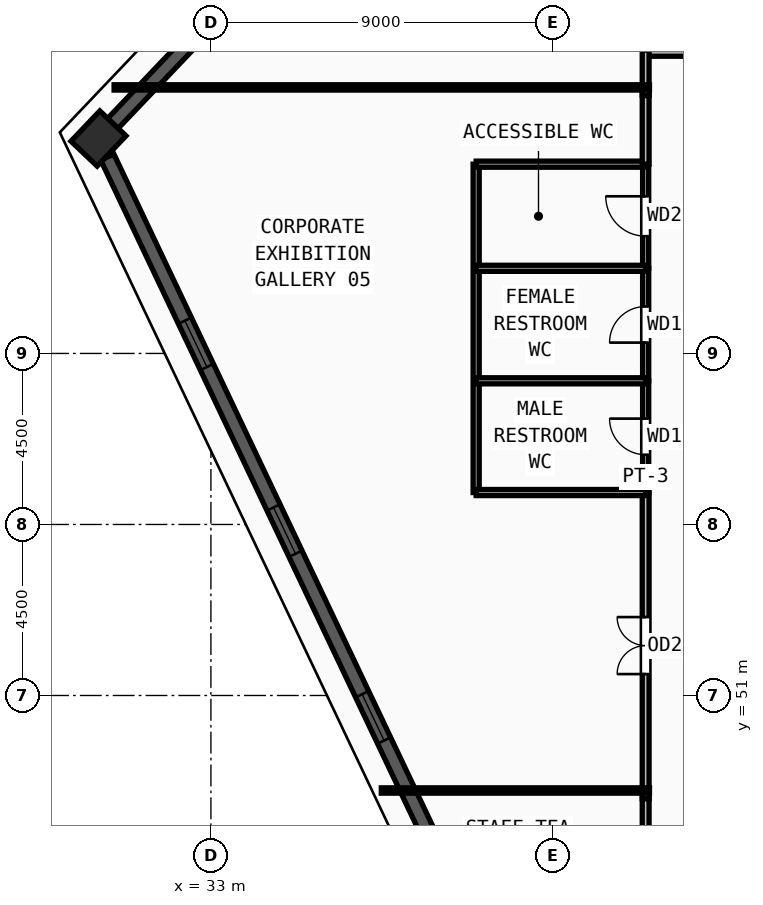
"""IFC4 building model, lengths in metres.
Left out: names, types, materials, properties, quantities, classifications, styles, units other than length and angle.
Written with IfcOpenShell. Run it as: python <this file> out.ifc"""

import sys

from ifc_helpers import new_model, si_unit, direction, frame, frame_2d, origin, origin_2d, place, context, subcontext, project, spatial, rectangle, extrude, source, transform, mapped, element, fill, save


model = new_model("IFC4")
c1 = context("Model", 3, precision=1e-05, world=origin(), true_north=direction((0.0, 1.0)))
c2 = subcontext(c1, "Body", "Model", "MODEL_VIEW")
j1 = project(units=[si_unit("LENGTHUNIT", "METRE"), si_unit("PLANEANGLEUNIT", "RADIAN")], contexts=[c1])
p1 = place(None, origin())
s1 = spatial("IfcSite", under=j1, at=p1, CompositionType="ELEMENT")
p2 = place(p1, origin())
s2 = spatial("IfcBuilding", under=s1, at=p2, CompositionType="ELEMENT")
p3 = place(p2, frame((0.0, 0.0, 309.0)))
s3 = spatial("IfcBuildingStorey", under=s2, at=p3, CompositionType="ELEMENT", Elevation=309.0)
m1 = source(origin(), c2, "Body", "SweptSolid", [
    extrude(rectangle(XDim=1.1, YDim=0.95, at=origin_2d()), origin(), (0.0, 0.0, 1.0), 3.75),
])
p4 = place(p3, frame((30.042, 65.655, 0.0), z_axis=(0.0, 0.0, 1.0), x_axis=(0.68936671806, 0.724412539946, 0.0)))
e1 = element("IfcColumn", 1, at=p4, inside=s3, PredefinedType="COLUMN", context=c2, shape_type="MappedRepresentation", body=[
    mapped(m1, transform((0.0, 0.0, 0.0), x_axis=(1.0, 0.0, 0.0), y_axis=(0.0, 1.0, 0.0), z_axis=(0.0, 0.0, 1.0), scale=1.0)),
])
p5 = place(p3, frame((33.135, 68.905, 0.0), z_axis=(0.0, 0.0, 1.0), x_axis=(-0.689384826268, -0.724395307351, 0.0)))
e2 = element("IfcWall", 2, at=p5, inside=s3, PredefinedType="SOLIDWALL", context=c2, shape_type="SweptSolid", body=[
    extrude(rectangle(XDim=3.947, YDim=0.38, at=frame_2d((1.974, 0.0))), origin(), (0.0, 0.0, 1.0), 3.57),
])
p6 = place(p3, frame((30.273, 65.167, 0.0), z_axis=(0.0, 0.0, 1.0), x_axis=(0.428684844901, -0.903454096096, 0.0)))
e3 = element("IfcWall", 3, at=p6, inside=s3, PredefinedType="SOLIDWALL", context=c2, shape_type="SweptSolid", body=[
    extrude(rectangle(XDim=21.758, YDim=0.38, at=frame_2d((10.879, 0.0))), origin(), (0.0, 0.0, 1.0), 3.57),
])
m2 = source(origin(), c2, "Body", "SweptSolid", [
    extrude(rectangle(XDim=1.35, YDim=1.85, at=frame_2d((0.675, 0.925))), frame((0.0, 0.2, 0.0), z_axis=(0.0, -1.0, 0.0), x_axis=(1.0, 0.0, 0.0)), (0.0, 0.0, 1.0), 0.4),
])
p7 = place(p6, frame((4.764, 0.0, 0.55)))
e4 = element("IfcOpeningElement", 4, at=p7, cuts=e3, PredefinedType="OPENING", context=c2, shape_type="MappedRepresentation", body=[
    mapped(m2, transform((0.0, 0.0, 0.0), x_axis=(1.0, 0.0, 0.0), y_axis=(0.0, 1.0, 0.0), z_axis=(0.0, 0.0, 1.0), scale=1.0)),
])
p8 = place(p6, frame((10.204, 0.0, 0.55)))
e5 = element("IfcOpeningElement", 5, at=p8, cuts=e3, PredefinedType="OPENING", context=c2, shape_type="MappedRepresentation", body=[
    mapped(m2, transform((0.0, 0.0, 0.0), x_axis=(1.0, 0.0, 0.0), y_axis=(0.0, 1.0, 0.0), z_axis=(0.0, 0.0, 1.0), scale=1.0)),
])
p9 = place(p6, frame((15.643, 0.0, 0.55)))
e6 = element("IfcOpeningElement", 6, at=p9, cuts=e3, PredefinedType="OPENING", context=c2, shape_type="MappedRepresentation", body=[
    mapped(m2, transform((0.0, 0.0, 0.0), x_axis=(1.0, 0.0, 0.0), y_axis=(0.0, 1.0, 0.0), z_axis=(0.0, 0.0, 1.0), scale=1.0)),
])
p10 = place(p3, frame((44.44, 56.34, 0.0), z_axis=(0.0, 0.0, 1.0), x_axis=(0.0, 1.0, 0.0)))
e7 = element("IfcWall", 7, at=p10, inside=s3, PredefinedType="PARTITIONING", context=c2, shape_type="SweptSolid", body=[
    extrude(rectangle(XDim=2.94, YDim=0.16, at=frame_2d((1.47, 0.0))), origin(), (0.0, 0.0, 1.0), 3.57),
])
m3 = source(origin(), c2, "Body", "SweptSolid", [
    extrude(rectangle(XDim=0.95, YDim=2.15, at=frame_2d((0.475, 1.075))), frame((0.0, 0.09, 0.0), z_axis=(0.0, -1.0, 0.0), x_axis=(1.0, 0.0, 0.0)), (0.0, 0.0, 1.0), 0.18),
])
p11 = place(p10, frame((0.995, 0.0, 0.0)))
e8 = element("IfcOpeningElement", 8, at=p11, cuts=e7, PredefinedType="OPENING", context=c2, shape_type="MappedRepresentation", body=[
    mapped(m3, transform((0.0, 0.0, 0.0), x_axis=(1.0, 0.0, 0.0), y_axis=(0.0, 1.0, 0.0), z_axis=(0.0, 0.0, 1.0), scale=1.0)),
])
p12 = place(p3, frame((44.44, 59.28, 0.0), z_axis=(0.0, 0.0, 1.0), x_axis=(0.0, 1.0, 0.0)))
e9 = element("IfcWall", 9, at=p12, inside=s3, PredefinedType="PARTITIONING", context=c2, shape_type="SweptSolid", body=[
    extrude(rectangle(XDim=2.96, YDim=0.16, at=frame_2d((1.48, 0.0))), origin(), (0.0, 0.0, 1.0), 3.57),
])
p13 = place(p12, frame((1.005, 0.0, 0.0)))
e10 = element("IfcOpeningElement", 10, at=p13, cuts=e9, PredefinedType="OPENING", context=c2, shape_type="MappedRepresentation", body=[
    mapped(m3, transform((0.0, 0.0, 0.0), x_axis=(1.0, 0.0, 0.0), y_axis=(0.0, 1.0, 0.0), z_axis=(0.0, 0.0, 1.0), scale=1.0)),
])
p14 = place(p3, frame((44.44, 62.24, 0.0), z_axis=(0.0, 0.0, 1.0), x_axis=(0.0, 1.0, 0.0)))
e11 = element("IfcWall", 11, at=p14, inside=s3, PredefinedType="PARTITIONING", context=c2, shape_type="SweptSolid", body=[
    extrude(rectangle(XDim=2.74, YDim=0.16, at=frame_2d((1.37, 0.0))), origin(), (0.0, 0.0, 1.0), 3.57),
])
m4 = source(origin(), c2, "Body", "SweptSolid", [
    extrude(rectangle(XDim=1.05, YDim=2.15, at=frame_2d((0.525, 1.075))), frame((0.0, 0.09, 0.0), z_axis=(0.0, -1.0, 0.0), x_axis=(1.0, 0.0, 0.0)), (0.0, 0.0, 1.0), 0.18),
])
p15 = place(p14, frame((0.845, 0.0, 0.0)))
e12 = element("IfcOpeningElement", 12, at=p15, cuts=e11, PredefinedType="OPENING", context=c2, shape_type="MappedRepresentation", body=[
    mapped(m4, transform((0.0, 0.0, 0.0), x_axis=(1.0, 0.0, 0.0), y_axis=(0.0, 1.0, 0.0), z_axis=(0.0, 0.0, 1.0), scale=1.0)),
])
p16 = place(p3, frame((44.44, 48.285, 0.0), z_axis=(0.0, 0.0, 1.0), x_axis=(0.0, 1.0, 0.0)))
e13 = element("IfcWall", 13, at=p16, inside=s3, PredefinedType="PARTITIONING", context=c2, shape_type="SweptSolid", body=[
    extrude(rectangle(XDim=8.055, YDim=0.18, at=frame_2d((4.028, 0.0))), origin(), (0.0, 0.0, 1.0), 3.261),
])
m5 = source(origin(), c2, "Body", "SweptSolid", [
    extrude(rectangle(XDim=1.5, YDim=2.2, at=frame_2d((0.75, 1.1))), frame((0.0, 0.1, 0.0), z_axis=(0.0, -1.0, 0.0), x_axis=(1.0, 0.0, 0.0)), (0.0, 0.0, 1.0), 0.2),
])
p17 = place(p16, frame((3.278, 0.0, 0.0)))
e14 = element("IfcOpeningElement", 14, at=p17, cuts=e13, PredefinedType="OPENING", context=c2, shape_type="MappedRepresentation", body=[
    mapped(m5, transform((0.0, 0.0, 0.0), x_axis=(1.0, 0.0, 0.0), y_axis=(0.0, 1.0, 0.0), z_axis=(0.0, 0.0, 1.0), scale=1.0)),
])
p18 = place(p3, frame((44.44, 44.385, 0.0), z_axis=(0.0, 0.0, 1.0), x_axis=(0.0, 1.0, 0.0)))
e15 = element("IfcWall", 15, at=p18, inside=s3, PredefinedType="PARTITIONING", context=c2, shape_type="SweptSolid", body=[
    extrude(rectangle(XDim=3.9, YDim=0.18, at=frame_2d((1.95, 0.0))), origin(), (0.0, 0.0, 1.0), 3.57),
])
m6 = source(origin(), c2, "Body", "SweptSolid", [
    extrude(rectangle(XDim=1.0, YDim=2.2, at=frame_2d((0.5, 1.1))), frame((0.0, 0.1, 0.0), z_axis=(0.0, -1.0, 0.0), x_axis=(1.0, 0.0, 0.0)), (0.0, 0.0, 1.0), 0.2),
])
p19 = place(p18, frame((1.45, 0.0, 0.0)))
e16 = element("IfcOpeningElement", 16, at=p19, cuts=e15, PredefinedType="OPENING", context=c2, shape_type="MappedRepresentation", body=[
    mapped(m6, transform((0.0, 0.0, 0.0), x_axis=(1.0, 0.0, 0.0), y_axis=(0.0, 1.0, 0.0), z_axis=(0.0, 0.0, 1.0), scale=1.0)),
])
p20 = place(p3, frame((39.98, 56.34, 0.0), z_axis=(0.0, 0.0, 1.0), x_axis=(0.0, 1.0, 0.0)))
e17 = element("IfcWall", 17, at=p20, inside=s3, PredefinedType="PARTITIONING", context=c2, shape_type="SweptSolid", body=[
    extrude(rectangle(XDim=8.64, YDim=0.16, at=frame_2d((4.32, 0.0))), origin(), (0.0, 0.0, 1.0), 3.57),
])
for number, where, z_axis, x_axis in (
    (18, (39.98, 56.34, 0.0), (0.0, 0.0, 1.0), (1.0, 0.0, 0.0)),
    (19, (39.98, 59.28, 0.0), (0.0, 0.0, 1.0), (1.0, 0.0, 0.0)),
    (20, (39.98, 62.24, 0.0), (0.0, 0.0, 1.0), (1.0, 0.0, 0.0)),
    (21, (39.98, 64.98, 0.0), (0.0, 0.0, 1.0), (1.0, 0.0, 0.0)),
):
    element("IfcWall", number, at=place(p3, frame(where, z_axis=z_axis, x_axis=x_axis)), inside=s3, PredefinedType="PARTITIONING", context=c2, shape_type="SweptSolid", body=[
        extrude(rectangle(XDim=4.46, YDim=0.16, at=frame_2d((2.23, 0.0))), origin(), (0.0, 0.0, 1.0), 3.57),
    ])
p21 = place(p3, frame((44.37, 67.91, 0.0), z_axis=(0.0, 0.0, 1.0), x_axis=(1.0, 0.0, 0.0)))
e22 = element("IfcWall", 22, at=p21, inside=s3, PredefinedType="PARTITIONING", context=c2, shape_type="SweptSolid", body=[
    extrude(rectangle(XDim=7.64, YDim=0.18, at=frame_2d((3.82, 0.0))), origin(), (0.0, 0.0, 1.0), 3.57),
])
p22 = place(p3, frame((44.44, 66.785, 0.0), z_axis=(0.0, 0.0, 1.0), x_axis=(0.0, 1.0, 0.0)))
e23 = element("IfcWall", 23, at=p22, inside=s3, PredefinedType="PARTITIONING", context=c2, shape_type="SweptSolid", body=[
    extrude(rectangle(XDim=1.195, YDim=0.18, at=frame_2d((0.598, 0.0))), origin(), (0.0, 0.0, 1.0), 3.57),
])
p23 = place(p3, frame((44.44, 64.98, 0.0), z_axis=(0.0, 0.0, 1.0), x_axis=(0.0, 1.0, 0.0)))
e24 = element("IfcWall", 24, at=p23, inside=s3, PredefinedType="PARTITIONING", context=c2, shape_type="SweptSolid", body=[
    extrude(rectangle(XDim=1.805, YDim=0.18, at=frame_2d((0.902, 0.0))), origin(), (0.0, 0.0, 1.0), 3.57),
])
p24 = place(p3, frame((44.54, 48.5, 0.0), z_axis=(0.0, 0.0, 1.0), x_axis=(-1.0, 0.0, 0.0)))
e25 = element("IfcWall", 25, at=p24, inside=s3, PredefinedType="PARTITIONING", context=c2, shape_type="SweptSolid", body=[
    extrude(rectangle(XDim=7.056, YDim=0.14, at=frame_2d((3.528, 0.0))), origin(), (0.0, 0.0, 1.0), 3.57),
])
p25 = place(p3, frame((44.54, 67.0, 0.0), z_axis=(0.0, 0.0, 1.0), x_axis=(-1.0, 0.0, 0.0)))
e26 = element("IfcWall", 26, at=p25, inside=s3, PredefinedType="PARTITIONING", context=c2, shape_type="SweptSolid", body=[
    extrude(rectangle(XDim=14.087, YDim=0.14, at=frame_2d((7.043, 0.0))), origin(), (0.0, 0.0, 1.0), 3.261),
])
m7 = source(origin(), c2, "Body", "SweptSolid", [
    extrude(rectangle(XDim=1.35, YDim=1.85, at=frame_2d((0.675, 0.925))), frame((0.0, 0.03, 0.0), z_axis=(0.0, -1.0, 0.0), x_axis=(1.0, 0.0, 0.0)), (0.0, 0.0, 1.0), 0.06),
])
p26 = place(p7, origin())
e27 = element("IfcWindow", 27, at=p26, inside=s3, PartitioningType="SINGLE_PANEL", PredefinedType="WINDOW", context=c2, shape_type="MappedRepresentation", body=[
    mapped(m7, transform((0.0, 0.0, 0.0), x_axis=(1.0, 0.0, 0.0), y_axis=(0.0, 1.0, 0.0), z_axis=(0.0, 0.0, 1.0), scale=1.0)),
])
fill(e4, e27)
p27 = place(p8, origin())
e28 = element("IfcWindow", 28, at=p27, inside=s3, PartitioningType="SINGLE_PANEL", PredefinedType="WINDOW", context=c2, shape_type="MappedRepresentation", body=[
    mapped(m7, transform((0.0, 0.0, 0.0), x_axis=(1.0, 0.0, 0.0), y_axis=(0.0, 1.0, 0.0), z_axis=(0.0, 0.0, 1.0), scale=1.0)),
])
fill(e5, e28)
p28 = place(p9, origin())
e29 = element("IfcWindow", 29, at=p28, inside=s3, PartitioningType="SINGLE_PANEL", PredefinedType="WINDOW", context=c2, shape_type="MappedRepresentation", body=[
    mapped(m7, transform((0.0, 0.0, 0.0), x_axis=(1.0, 0.0, 0.0), y_axis=(0.0, 1.0, 0.0), z_axis=(0.0, 0.0, 1.0), scale=1.0)),
])
fill(e6, e29)
m8 = source(origin(), c2, "Body", "SweptSolid", [
    extrude(rectangle(XDim=0.95, YDim=2.15, at=frame_2d((0.475, 1.075))), frame((0.0, 0.025, 0.0), z_axis=(0.0, -1.0, 0.0), x_axis=(1.0, 0.0, 0.0)), (0.0, 0.0, 1.0), 0.05),
])
p29 = place(p11, origin())
e30 = element("IfcDoor", 30, at=p29, inside=s3, OperationType="SINGLE_SWING_RIGHT", PredefinedType="DOOR", context=c2, shape_type="MappedRepresentation", body=[
    mapped(m8, transform((0.0, 0.0, 0.0), x_axis=(1.0, 0.0, 0.0), y_axis=(0.0, 1.0, 0.0), z_axis=(0.0, 0.0, 1.0), scale=1.0)),
])
fill(e8, e30)
p30 = place(p13, origin())
e31 = element("IfcDoor", 31, at=p30, inside=s3, OperationType="SINGLE_SWING_LEFT", PredefinedType="DOOR", context=c2, shape_type="MappedRepresentation", body=[
    mapped(m8, transform((0.0, 0.0, 0.0), x_axis=(1.0, 0.0, 0.0), y_axis=(0.0, 1.0, 0.0), z_axis=(0.0, 0.0, 1.0), scale=1.0)),
])
fill(e10, e31)
m9 = source(origin(), c2, "Body", "SweptSolid", [
    extrude(rectangle(XDim=1.05, YDim=2.15, at=frame_2d((0.525, 1.075))), frame((0.0, 0.025, 0.0), z_axis=(0.0, -1.0, 0.0), x_axis=(1.0, 0.0, 0.0)), (0.0, 0.0, 1.0), 0.05),
])
p31 = place(p15, origin())
e32 = element("IfcDoor", 32, at=p31, inside=s3, OperationType="SINGLE_SWING_RIGHT", PredefinedType="DOOR", context=c2, shape_type="MappedRepresentation", body=[
    mapped(m9, transform((0.0, 0.0, 0.0), x_axis=(1.0, 0.0, 0.0), y_axis=(0.0, 1.0, 0.0), z_axis=(0.0, 0.0, 1.0), scale=1.0)),
])
fill(e12, e32)
m10 = source(origin(), c2, "Body", "SweptSolid", [
    extrude(rectangle(XDim=1.5, YDim=2.2, at=frame_2d((0.75, 1.1))), frame((0.0, 0.025, 0.0), z_axis=(0.0, -1.0, 0.0), x_axis=(1.0, 0.0, 0.0)), (0.0, 0.0, 1.0), 0.05),
])
p32 = place(p17, origin())
e33 = element("IfcDoor", 33, at=p32, inside=s3, OperationType="DOUBLE_DOOR_SINGLE_SWING", PredefinedType="DOOR", context=c2, shape_type="MappedRepresentation", body=[
    mapped(m10, transform((0.0, 0.0, 0.0), x_axis=(1.0, 0.0, 0.0), y_axis=(0.0, 1.0, 0.0), z_axis=(0.0, 0.0, 1.0), scale=1.0)),
])
fill(e14, e33)
save(model, sys.argv[1])
